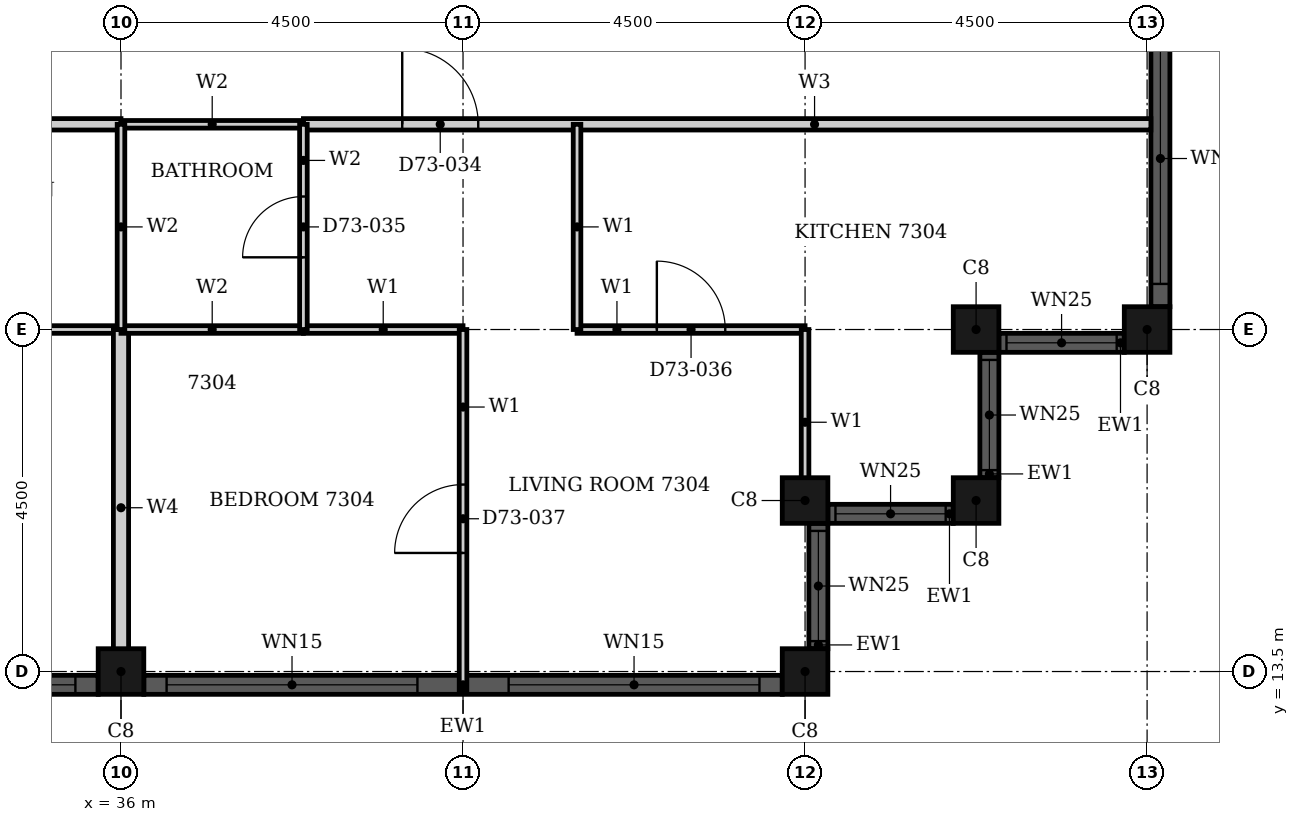
"""IFC4 building model, lengths in metres.
Left out: names, types, materials, properties, quantities, classifications, styles, units other than length and angle.
Written with IfcOpenShell. Run it as: python <this file> out.ifc"""

import sys

from ifc_helpers import new_model, si_unit, direction, frame, frame_2d, origin, origin_2d, place, context, subcontext, project, spatial, rectangle, hollow_rectangle, extrude, element, fill, save


model = new_model("IFC4")
c1 = context("Model", 3, precision=1e-05, world=origin(), true_north=direction((0.0, 1.0)))
c2 = subcontext(c1, "Body", "Model", "MODEL_VIEW")
j1 = project(units=[si_unit("LENGTHUNIT", "METRE"), si_unit("PLANEANGLEUNIT", "RADIAN")], contexts=[c1])
p1 = place(None, origin())
s1 = spatial("IfcSite", under=j1, at=p1, CompositionType="ELEMENT")
p2 = place(p1, origin())
s2 = spatial("IfcBuilding", under=s1, at=p2, CompositionType="ELEMENT")
p3 = place(p2, frame((0.0, 0.0, 287.1)))
s3 = spatial("IfcBuildingStorey", under=s2, at=p3, CompositionType="ELEMENT", Elevation=287.1)
for number, where, z_axis, x_axis in (
    (1, (45.0, 13.5, 0.0), (0.0, 0.0, 1.0), (1.0, 0.0, 0.0)),
    (2, (45.0, 15.75, 0.0), (0.0, 0.0, 1.0), (1.0, 0.0, 0.0)),
    (3, (47.25, 15.75, 0.0), (0.0, 0.0, 1.0), (1.0, 0.0, 0.0)),
    (4, (47.25, 18.0, 0.0), (0.0, 0.0, 1.0), (1.0, 0.0, 0.0)),
    (5, (49.5, 18.0, 0.0), (0.0, 0.0, 1.0), (1.0, 0.0, 0.0)),
    (6, (36.0, 13.5, 0.0), (0.0, 0.0, 1.0), (1.0, 0.0, 0.0)),
):
    element("IfcColumn", number, at=place(p3, frame(where, z_axis=z_axis, x_axis=x_axis)), inside=s3, PredefinedType="COLUMN", context=c2, shape_type="SweptSolid", body=[
        extrude(hollow_rectangle(XDim=0.6, YDim=0.6, WallThickness=0.02, at=origin_2d()), origin(), (0.0, 0.0, 1.0), 3.7),
    ])
p4 = place(p3, frame((45.175, 13.8, 0.0), z_axis=(0.0, 0.0, 1.0), x_axis=(0.0, 1.0, 0.0)))
e7 = element("IfcWall", 7, at=p4, inside=s3, PredefinedType="SOLIDWALL", context=c2, shape_type="SweptSolid", body=[
    extrude(rectangle(XDim=1.65, YDim=0.25, at=frame_2d((0.825, 0.0))), origin(), (0.0, 0.0, 1.0), 3.7),
])
p5 = place(p4, frame((0.1, 0.0, 0.9)))
e8 = element("IfcOpeningElement", 8, at=p5, cuts=e7, PredefinedType="OPENING", context=c2, shape_type="SweptSolid", body=[
    extrude(rectangle(XDim=1.45, YDim=1.85, at=frame_2d((0.725, 0.925))), frame((0.0, 0.135, 0.0), z_axis=(0.0, -1.0, 0.0), x_axis=(1.0, 0.0, 0.0)), (0.0, 0.0, 1.0), 0.27),
])
p6 = place(p3, frame((45.3, 15.575, 0.0), z_axis=(0.0, 0.0, 1.0), x_axis=(1.0, 0.0, 0.0)))
e9 = element("IfcWall", 9, at=p6, inside=s3, PredefinedType="SOLIDWALL", context=c2, shape_type="SweptSolid", body=[
    extrude(rectangle(XDim=1.65, YDim=0.25, at=frame_2d((0.825, 0.0))), origin(), (0.0, 0.0, 1.0), 3.7),
])
p7 = place(p6, frame((0.1, 0.0, 0.9)))
e10 = element("IfcOpeningElement", 10, at=p7, cuts=e9, PredefinedType="OPENING", context=c2, shape_type="SweptSolid", body=[
    extrude(rectangle(XDim=1.45, YDim=1.85, at=frame_2d((0.725, 0.925))), frame((0.0, 0.135, 0.0), z_axis=(0.0, -1.0, 0.0), x_axis=(1.0, 0.0, 0.0)), (0.0, 0.0, 1.0), 0.27),
])
p8 = place(p3, frame((47.425, 16.05, 0.0), z_axis=(0.0, 0.0, 1.0), x_axis=(0.0, 1.0, 0.0)))
e11 = element("IfcWall", 11, at=p8, inside=s3, PredefinedType="SOLIDWALL", context=c2, shape_type="SweptSolid", body=[
    extrude(rectangle(XDim=1.65, YDim=0.25, at=frame_2d((0.825, 0.0))), origin(), (0.0, 0.0, 1.0), 3.7),
])
p9 = place(p8, frame((0.1, 0.0, 0.9)))
e12 = element("IfcOpeningElement", 12, at=p9, cuts=e11, PredefinedType="OPENING", context=c2, shape_type="SweptSolid", body=[
    extrude(rectangle(XDim=1.45, YDim=1.85, at=frame_2d((0.725, 0.925))), frame((0.0, 0.135, 0.0), z_axis=(0.0, -1.0, 0.0), x_axis=(1.0, 0.0, 0.0)), (0.0, 0.0, 1.0), 0.27),
])
p10 = place(p3, frame((47.55, 17.825, 0.0), z_axis=(0.0, 0.0, 1.0), x_axis=(1.0, 0.0, 0.0)))
e13 = element("IfcWall", 13, at=p10, inside=s3, PredefinedType="SOLIDWALL", context=c2, shape_type="SweptSolid", body=[
    extrude(rectangle(XDim=1.65, YDim=0.25, at=frame_2d((0.825, 0.0))), origin(), (0.0, 0.0, 1.0), 3.7),
])
p11 = place(p10, frame((0.1, 0.0, 0.9)))
e14 = element("IfcOpeningElement", 14, at=p11, cuts=e13, PredefinedType="OPENING", context=c2, shape_type="SweptSolid", body=[
    extrude(rectangle(XDim=1.45, YDim=1.85, at=frame_2d((0.725, 0.925))), frame((0.0, 0.135, 0.0), z_axis=(0.0, -1.0, 0.0), x_axis=(1.0, 0.0, 0.0)), (0.0, 0.0, 1.0), 0.27),
])
p12 = place(p3, frame((49.675, 18.3, 0.0), z_axis=(0.0, 0.0, 1.0), x_axis=(0.0, 1.0, 0.0)))
e15 = element("IfcWall", 15, at=p12, inside=s3, PredefinedType="SOLIDWALL", context=c2, shape_type="SweptSolid", body=[
    extrude(rectangle(XDim=8.4, YDim=0.25, at=frame_2d((4.2, 0.0))), origin(), (0.0, 0.0, 1.0), 3.7),
])
p13 = place(p12, frame((0.3, 0.0, 0.45)))
e16 = element("IfcOpeningElement", 16, at=p13, cuts=e15, PredefinedType="OPENING", context=c2, shape_type="SweptSolid", body=[
    extrude(rectangle(XDim=3.3, YDim=2.3, at=frame_2d((1.65, 1.15))), frame((0.0, 0.135, 0.0), z_axis=(0.0, -1.0, 0.0), x_axis=(1.0, 0.0, 0.0)), (0.0, 0.0, 1.0), 0.27),
])
p14 = place(p12, frame((4.8, 0.0, 0.45)))
e17 = element("IfcOpeningElement", 17, at=p14, cuts=e15, PredefinedType="OPENING", context=c2, shape_type="SweptSolid", body=[
    extrude(rectangle(XDim=3.3, YDim=2.3, at=frame_2d((1.65, 1.15))), frame((0.0, 0.135, 0.0), z_axis=(0.0, -1.0, 0.0), x_axis=(1.0, 0.0, 0.0)), (0.0, 0.0, 1.0), 0.27),
])
p15 = place(p3, frame((27.3, 13.325, 0.0), z_axis=(0.0, 0.0, 1.0), x_axis=(1.0, 0.0, 0.0)))
e18 = element("IfcWall", 18, at=p15, inside=s3, PredefinedType="SOLIDWALL", context=c2, shape_type="SweptSolid", body=[
    extrude(rectangle(XDim=8.4, YDim=0.25, at=frame_2d((4.2, 0.0))), origin(), (0.0, 0.0, 1.0), 3.7),
])
p16 = place(p15, frame((0.3, 0.0, 0.45)))
e19 = element("IfcOpeningElement", 19, at=p16, cuts=e18, PredefinedType="OPENING", context=c2, shape_type="SweptSolid", body=[
    extrude(rectangle(XDim=3.3, YDim=2.3, at=frame_2d((1.65, 1.15))), frame((0.0, 0.135, 0.0), z_axis=(0.0, -1.0, 0.0), x_axis=(1.0, 0.0, 0.0)), (0.0, 0.0, 1.0), 0.27),
])
p17 = place(p15, frame((4.8, 0.0, 0.45)))
e20 = element("IfcOpeningElement", 20, at=p17, cuts=e18, PredefinedType="OPENING", context=c2, shape_type="SweptSolid", body=[
    extrude(rectangle(XDim=3.3, YDim=2.3, at=frame_2d((1.65, 1.15))), frame((0.0, 0.135, 0.0), z_axis=(0.0, -1.0, 0.0), x_axis=(1.0, 0.0, 0.0)), (0.0, 0.0, 1.0), 0.27),
])
p18 = place(p3, frame((36.3, 13.325, 0.0), z_axis=(0.0, 0.0, 1.0), x_axis=(1.0, 0.0, 0.0)))
e21 = element("IfcWall", 21, at=p18, inside=s3, PredefinedType="SOLIDWALL", context=c2, shape_type="SweptSolid", body=[
    extrude(rectangle(XDim=8.4, YDim=0.25, at=frame_2d((4.2, 0.0))), origin(), (0.0, 0.0, 1.0), 3.7),
])
p19 = place(p18, frame((0.3, 0.0, 0.45)))
e22 = element("IfcOpeningElement", 22, at=p19, cuts=e21, PredefinedType="OPENING", context=c2, shape_type="SweptSolid", body=[
    extrude(rectangle(XDim=3.3, YDim=2.3, at=frame_2d((1.65, 1.15))), frame((0.0, 0.135, 0.0), z_axis=(0.0, -1.0, 0.0), x_axis=(1.0, 0.0, 0.0)), (0.0, 0.0, 1.0), 0.27),
])
p20 = place(p18, frame((4.8, 0.0, 0.45)))
e23 = element("IfcOpeningElement", 23, at=p20, cuts=e21, PredefinedType="OPENING", context=c2, shape_type="SweptSolid", body=[
    extrude(rectangle(XDim=3.3, YDim=2.3, at=frame_2d((1.65, 1.15))), frame((0.0, 0.135, 0.0), z_axis=(0.0, -1.0, 0.0), x_axis=(1.0, 0.0, 0.0)), (0.0, 0.0, 1.0), 0.27),
])
p21 = place(p3, frame((29.4, 20.7, 0.0), z_axis=(0.0, 0.0, 1.0), x_axis=(1.0, 0.0, 0.0)))
e24 = element("IfcWall", 24, at=p21, inside=s3, PredefinedType="PARTITIONING", context=c2, shape_type="SweptSolid", body=[
    extrude(rectangle(XDim=6.6, YDim=0.15, at=frame_2d((3.3, 0.0))), origin(), (0.0, 0.0, 1.0), 3.4),
])
p22 = place(p21, frame((1.3, 0.0, 0.0)))
e25 = element("IfcOpeningElement", 25, at=p22, cuts=e24, PredefinedType="OPENING", context=c2, shape_type="SweptSolid", body=[
    extrude(rectangle(XDim=1.0, YDim=2.2, at=frame_2d((0.5, 1.1))), frame((0.0, 0.085, 0.0), z_axis=(0.0, -1.0, 0.0), x_axis=(1.0, 0.0, 0.0)), (0.0, 0.0, 1.0), 0.17),
])
p23 = place(p3, frame((38.4, 20.7, 0.0), z_axis=(0.0, 0.0, 1.0), x_axis=(1.0, 0.0, 0.0)))
e26 = element("IfcWall", 26, at=p23, inside=s3, PredefinedType="PARTITIONING", context=c2, shape_type="SweptSolid", body=[
    extrude(rectangle(XDim=11.15, YDim=0.15, at=frame_2d((5.575, 0.0))), origin(), (0.0, 0.0, 1.0), 3.4),
])
p24 = place(p23, frame((1.3, 0.0, 0.0)))
e27 = element("IfcOpeningElement", 27, at=p24, cuts=e26, PredefinedType="OPENING", context=c2, shape_type="SweptSolid", body=[
    extrude(rectangle(XDim=1.0, YDim=2.2, at=frame_2d((0.5, 1.1))), frame((0.0, 0.085, 0.0), z_axis=(0.0, -1.0, 0.0), x_axis=(1.0, 0.0, 0.0)), (0.0, 0.0, 1.0), 0.17),
])
p25 = place(p3, frame((33.0, 18.0, 0.0), z_axis=(0.0, 0.0, 1.0), x_axis=(1.0, 0.0, 0.0)))
e28 = element("IfcWall", 28, at=p25, inside=s3, PredefinedType="PARTITIONING", context=c2, shape_type="SweptSolid", body=[
    extrude(rectangle(XDim=3.0, YDim=0.1, at=frame_2d((1.5, 0.0))), origin(), (0.0, 0.0, 1.0), 3.4),
])
p26 = place(p25, frame((1.05, 0.0, 0.0)))
e29 = element("IfcOpeningElement", 29, at=p26, cuts=e28, PredefinedType="OPENING", context=c2, shape_type="SweptSolid", body=[
    extrude(rectangle(XDim=0.9, YDim=2.1, at=frame_2d((0.45, 1.05))), frame((0.0, 0.06, 0.0), z_axis=(0.0, -1.0, 0.0), x_axis=(1.0, 0.0, 0.0)), (0.0, 0.0, 1.0), 0.12),
])
p27 = place(p3, frame((38.4, 18.0, 0.0), z_axis=(0.0, 0.0, 1.0), x_axis=(1.0, 0.0, 0.0)))
e30 = element("IfcWall", 30, at=p27, inside=s3, PredefinedType="PARTITIONING", context=c2, shape_type="SweptSolid", body=[
    extrude(rectangle(XDim=2.1, YDim=0.1, at=frame_2d((1.05, 0.0))), origin(), (0.0, 0.0, 1.0), 3.4),
])
p28 = place(p3, frame((42.0, 18.0, 0.0), z_axis=(0.0, 0.0, 1.0), x_axis=(1.0, 0.0, 0.0)))
e31 = element("IfcWall", 31, at=p28, inside=s3, PredefinedType="PARTITIONING", context=c2, shape_type="SweptSolid", body=[
    extrude(rectangle(XDim=3.0, YDim=0.1, at=frame_2d((1.5, 0.0))), origin(), (0.0, 0.0, 1.0), 3.4),
])
p29 = place(p28, frame((1.05, 0.0, 0.0)))
e32 = element("IfcOpeningElement", 32, at=p29, cuts=e31, PredefinedType="OPENING", context=c2, shape_type="SweptSolid", body=[
    extrude(rectangle(XDim=0.9, YDim=2.1, at=frame_2d((0.45, 1.05))), frame((0.0, 0.06, 0.0), z_axis=(0.0, -1.0, 0.0), x_axis=(1.0, 0.0, 0.0)), (0.0, 0.0, 1.0), 0.12),
])
p30 = place(p3, frame((40.5, 13.26, 0.0), z_axis=(0.0, 0.0, 1.0), x_axis=(0.0, 1.0, 0.0)))
e33 = element("IfcWall", 33, at=p30, inside=s3, PredefinedType="PARTITIONING", context=c2, shape_type="SweptSolid", body=[
    extrude(rectangle(XDim=4.74, YDim=0.1, at=frame_2d((2.37, 0.0))), origin(), (0.0, 0.0, 1.0), 3.4),
])
p31 = place(p30, frame((1.8, 0.0, 0.0)))
e34 = element("IfcOpeningElement", 34, at=p31, cuts=e33, PredefinedType="OPENING", context=c2, shape_type="SweptSolid", body=[
    extrude(rectangle(XDim=0.9, YDim=2.1, at=frame_2d((0.45, 1.05))), frame((0.0, 0.06, 0.0), z_axis=(0.0, -1.0, 0.0), x_axis=(1.0, 0.0, 0.0)), (0.0, 0.0, 1.0), 0.12),
])
p32 = place(p3, frame((42.0, 18.0, 0.0), z_axis=(0.0, 0.0, 1.0), x_axis=(0.0, 1.0, 0.0)))
e35 = element("IfcWall", 35, at=p32, inside=s3, PredefinedType="PARTITIONING", context=c2, shape_type="SweptSolid", body=[
    extrude(rectangle(XDim=2.7, YDim=0.1, at=frame_2d((1.35, 0.0))), origin(), (0.0, 0.0, 1.0), 3.4),
])
p33 = place(p3, frame((45.0, 15.56, 0.0), z_axis=(0.0, 0.0, 1.0), x_axis=(0.0, 1.0, 0.0)))
e36 = element("IfcWall", 36, at=p33, inside=s3, PredefinedType="PARTITIONING", context=c2, shape_type="SweptSolid", body=[
    extrude(rectangle(XDim=2.44, YDim=0.1, at=frame_2d((1.22, 0.0))), origin(), (0.0, 0.0, 1.0), 3.4),
])
p34 = place(p3, frame((36.0, 13.31, 0.0), z_axis=(0.0, 0.0, 1.0), x_axis=(0.0, 1.0, 0.0)))
e37 = element("IfcWall", 37, at=p34, inside=s3, PredefinedType="PARTITIONING", context=c2, shape_type="SweptSolid", body=[
    extrude(rectangle(XDim=4.69, YDim=0.2, at=frame_2d((2.345, 0.0))), origin(), (0.0, 0.0, 1.0), 3.4),
])
for number, where, z_axis, x_axis in (
    (38, (36.0, 18.0, 0.0), (0.0, 0.0, 1.0), (1.0, 0.0, 0.0)),
    (39, (36.0, 20.7, 0.0), (0.0, 0.0, 1.0), (1.0, 0.0, 0.0)),
):
    element("IfcWall", number, at=place(p3, frame(where, z_axis=z_axis, x_axis=x_axis)), inside=s3, PredefinedType="PARTITIONING", context=c2, shape_type="SweptSolid", body=[
        extrude(rectangle(XDim=2.4, YDim=0.1, at=frame_2d((1.2, 0.0))), origin(), (0.0, 0.0, 1.0), 3.4),
    ])
p35 = place(p3, frame((36.0, 18.0, 0.0), z_axis=(0.0, 0.0, 1.0), x_axis=(0.0, 1.0, 0.0)))
e40 = element("IfcWall", 40, at=p35, inside=s3, PredefinedType="PARTITIONING", context=c2, shape_type="SweptSolid", body=[
    extrude(rectangle(XDim=2.7, YDim=0.1, at=frame_2d((1.35, 0.0))), origin(), (0.0, 0.0, 1.0), 3.4),
])
p36 = place(p3, frame((38.4, 18.0, 0.0), z_axis=(0.0, 0.0, 1.0), x_axis=(0.0, 1.0, 0.0)))
e41 = element("IfcWall", 41, at=p36, inside=s3, PredefinedType="PARTITIONING", context=c2, shape_type="SweptSolid", body=[
    extrude(rectangle(XDim=2.7, YDim=0.1, at=frame_2d((1.35, 0.0))), origin(), (0.0, 0.0, 1.0), 3.4),
])
p37 = place(p36, frame((0.95, 0.0, 0.0)))
e42 = element("IfcOpeningElement", 42, at=p37, cuts=e41, PredefinedType="OPENING", context=c2, shape_type="SweptSolid", body=[
    extrude(rectangle(XDim=0.8, YDim=2.1, at=frame_2d((0.4, 1.05))), frame((0.0, 0.06, 0.0), z_axis=(0.0, -1.0, 0.0), x_axis=(1.0, 0.0, 0.0)), (0.0, 0.0, 1.0), 0.12),
])
p38 = place(p5, origin())
e43 = element("IfcWindow", 43, at=p38, inside=s3, PartitioningType="SINGLE_PANEL", PredefinedType="WINDOW", context=c2, shape_type="SweptSolid", body=[
    extrude(rectangle(XDim=1.45, YDim=1.85, at=frame_2d((0.725, 0.925))), frame((0.0, 0.03, 0.0), z_axis=(0.0, -1.0, 0.0), x_axis=(1.0, 0.0, 0.0)), (0.0, 0.0, 1.0), 0.06),
])
fill(e8, e43)
p39 = place(p7, origin())
e44 = element("IfcWindow", 44, at=p39, inside=s3, PartitioningType="SINGLE_PANEL", PredefinedType="WINDOW", context=c2, shape_type="SweptSolid", body=[
    extrude(rectangle(XDim=1.45, YDim=1.85, at=frame_2d((0.725, 0.925))), frame((0.0, 0.03, 0.0), z_axis=(0.0, -1.0, 0.0), x_axis=(1.0, 0.0, 0.0)), (0.0, 0.0, 1.0), 0.06),
])
fill(e10, e44)
p40 = place(p9, origin())
e45 = element("IfcWindow", 45, at=p40, inside=s3, PartitioningType="SINGLE_PANEL", PredefinedType="WINDOW", context=c2, shape_type="SweptSolid", body=[
    extrude(rectangle(XDim=1.45, YDim=1.85, at=frame_2d((0.725, 0.925))), frame((0.0, 0.03, 0.0), z_axis=(0.0, -1.0, 0.0), x_axis=(1.0, 0.0, 0.0)), (0.0, 0.0, 1.0), 0.06),
])
fill(e12, e45)
p41 = place(p11, origin())
e46 = element("IfcWindow", 46, at=p41, inside=s3, PartitioningType="SINGLE_PANEL", PredefinedType="WINDOW", context=c2, shape_type="SweptSolid", body=[
    extrude(rectangle(XDim=1.45, YDim=1.85, at=frame_2d((0.725, 0.925))), frame((0.0, 0.03, 0.0), z_axis=(0.0, -1.0, 0.0), x_axis=(1.0, 0.0, 0.0)), (0.0, 0.0, 1.0), 0.06),
])
fill(e14, e46)
p42 = place(p13, origin())
e47 = element("IfcWindow", 47, at=p42, inside=s3, PartitioningType="SINGLE_PANEL", PredefinedType="WINDOW", context=c2, shape_type="SweptSolid", body=[
    extrude(rectangle(XDim=3.3, YDim=2.3, at=frame_2d((1.65, 1.15))), frame((0.0, 0.03, 0.0), z_axis=(0.0, -1.0, 0.0), x_axis=(1.0, 0.0, 0.0)), (0.0, 0.0, 1.0), 0.06),
])
fill(e16, e47)
p43 = place(p17, origin())
e48 = element("IfcWindow", 48, at=p43, inside=s3, PartitioningType="SINGLE_PANEL", PredefinedType="WINDOW", context=c2, shape_type="SweptSolid", body=[
    extrude(rectangle(XDim=3.3, YDim=2.3, at=frame_2d((1.65, 1.15))), frame((0.0, 0.03, 0.0), z_axis=(0.0, -1.0, 0.0), x_axis=(1.0, 0.0, 0.0)), (0.0, 0.0, 1.0), 0.06),
])
fill(e20, e48)
p44 = place(p19, origin())
e49 = element("IfcWindow", 49, at=p44, inside=s3, PartitioningType="SINGLE_PANEL", PredefinedType="WINDOW", context=c2, shape_type="SweptSolid", body=[
    extrude(rectangle(XDim=3.3, YDim=2.3, at=frame_2d((1.65, 1.15))), frame((0.0, 0.03, 0.0), z_axis=(0.0, -1.0, 0.0), x_axis=(1.0, 0.0, 0.0)), (0.0, 0.0, 1.0), 0.06),
])
fill(e22, e49)
p45 = place(p20, origin())
e50 = element("IfcWindow", 50, at=p45, inside=s3, PartitioningType="SINGLE_PANEL", PredefinedType="WINDOW", context=c2, shape_type="SweptSolid", body=[
    extrude(rectangle(XDim=3.3, YDim=2.3, at=frame_2d((1.65, 1.15))), frame((0.0, 0.03, 0.0), z_axis=(0.0, -1.0, 0.0), x_axis=(1.0, 0.0, 0.0)), (0.0, 0.0, 1.0), 0.06),
])
fill(e23, e50)
p46 = place(p24, origin())
e51 = element("IfcDoor", 51, at=p46, inside=s3, OperationType="SINGLE_SWING_LEFT", PredefinedType="DOOR", context=c2, shape_type="SweptSolid", body=[
    extrude(rectangle(XDim=1.0, YDim=2.2, at=frame_2d((0.5, 1.1))), frame((0.0, 0.025, 0.0), z_axis=(0.0, -1.0, 0.0), x_axis=(1.0, 0.0, 0.0)), (0.0, 0.0, 1.0), 0.05),
])
fill(e27, e51)
p47 = place(p37, origin())
e52 = element("IfcDoor", 52, at=p47, inside=s3, OperationType="SINGLE_SWING_RIGHT", PredefinedType="DOOR", context=c2, shape_type="SweptSolid", body=[
    extrude(rectangle(XDim=0.8, YDim=2.1, at=frame_2d((0.4, 1.05))), frame((0.0, 0.025, 0.0), z_axis=(0.0, -1.0, 0.0), x_axis=(1.0, 0.0, 0.0)), (0.0, 0.0, 1.0), 0.05),
])
fill(e42, e52)
p48 = place(p29, origin())
e53 = element("IfcDoor", 53, at=p48, inside=s3, OperationType="SINGLE_SWING_LEFT", PredefinedType="DOOR", context=c2, shape_type="SweptSolid", body=[
    extrude(rectangle(XDim=0.9, YDim=2.1, at=frame_2d((0.45, 1.05))), frame((0.0, 0.025, 0.0), z_axis=(0.0, -1.0, 0.0), x_axis=(1.0, 0.0, 0.0)), (0.0, 0.0, 1.0), 0.05),
])
fill(e32, e53)
p49 = place(p31, origin())
e54 = element("IfcDoor", 54, at=p49, inside=s3, OperationType="SINGLE_SWING_LEFT", PredefinedType="DOOR", context=c2, shape_type="SweptSolid", body=[
    extrude(rectangle(XDim=0.9, YDim=2.1, at=frame_2d((0.45, 1.05))), frame((0.0, 0.025, 0.0), z_axis=(0.0, -1.0, 0.0), x_axis=(1.0, 0.0, 0.0)), (0.0, 0.0, 1.0), 0.05),
])
fill(e34, e54)
save(model, sys.argv[1])
